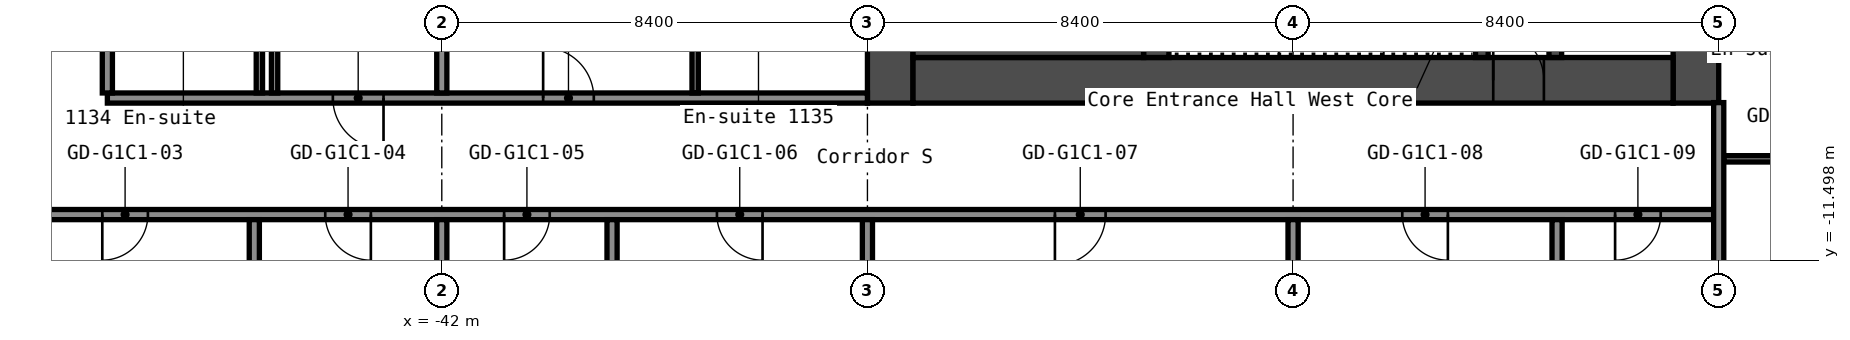
"""IFC4 building model, lengths in metres.
Left out: names, types, materials, properties, quantities, classifications, styles, units other than length and angle.
Written with IfcOpenShell. Run it as: python <this file> out.ifc"""

import sys

from ifc_helpers import new_model, si_unit, direction, frame, frame_2d, origin, place, context, subcontext, project, spatial, rectangle, extrude, element, fill, save


model = new_model("IFC4")
c1 = context("Model", 3, precision=1e-05, world=origin(), true_north=direction((0.0, 1.0)))
c2 = subcontext(c1, "Body", "Model", "MODEL_VIEW")
j1 = project(units=[si_unit("LENGTHUNIT", "METRE"), si_unit("PLANEANGLEUNIT", "RADIAN")], contexts=[c1])
p1 = place(None, origin())
s1 = spatial("IfcSite", under=j1, at=p1, CompositionType="ELEMENT")
p2 = place(p1, origin())
s2 = spatial("IfcBuilding", under=s1, at=p2, CompositionType="ELEMENT")
p3 = place(p2, frame((0.0, 0.0, 42.2)))
s3 = spatial("IfcBuildingStorey", under=s2, at=p3, CompositionType="ELEMENT", Elevation=42.2)
p4 = place(p3, frame((-17.25, -8.4, 0.0), z_axis=(0.0, 0.0, 1.0), x_axis=(0.0, 1.0, 0.0)))
e1 = element("IfcWall", 1, at=p4, inside=s3, PredefinedType="SHEAR", context=c2, shape_type="SweptSolid", body=[
    extrude(rectangle(XDim=16.8, YDim=0.9, at=frame_2d((8.4, 0.0))), origin(), (0.0, 0.0, 1.0), 2.8),
])
p5 = place(p4, frame((12.75, 0.0, 0.0)))
e2 = element("IfcOpeningElement", 2, at=p5, cuts=e1, PredefinedType="OPENING", context=c2, shape_type="SweptSolid", body=[
    extrude(rectangle(XDim=1.2, YDim=2.1, at=frame_2d((0.6, 1.05))), frame((0.0, 0.46, 0.0), z_axis=(0.0, -1.0, 0.0), x_axis=(1.0, 0.0, 0.0)), (0.0, 0.0, 1.0), 0.92),
])
p6 = place(p4, frame((2.85, 0.0, 0.0)))
e3 = element("IfcOpeningElement", 3, at=p6, cuts=e1, PredefinedType="OPENING", context=c2, shape_type="SweptSolid", body=[
    extrude(rectangle(XDim=1.2, YDim=2.1, at=frame_2d((0.6, 1.05))), frame((0.0, 0.46, 0.0), z_axis=(0.0, -1.0, 0.0), x_axis=(1.0, 0.0, 0.0)), (0.0, 0.0, 1.0), 0.92),
])
p7 = place(p3, frame((-33.15, -8.4, 0.0), z_axis=(0.0, 0.0, 1.0), x_axis=(0.0, 1.0, 0.0)))
e4 = element("IfcWall", 4, at=p7, inside=s3, PredefinedType="SHEAR", context=c2, shape_type="SweptSolid", body=[
    extrude(rectangle(XDim=16.8, YDim=0.9, at=frame_2d((8.4, 0.0))), origin(), (0.0, 0.0, 1.0), 2.8),
])
p8 = place(p3, frame((-32.7, -7.95, 0.0), z_axis=(0.0, 0.0, 1.0), x_axis=(1.0, 0.0, 0.0)))
e5 = element("IfcWall", 5, at=p8, inside=s3, PredefinedType="SHEAR", context=c2, shape_type="SweptSolid", body=[
    extrude(rectangle(XDim=15.0, YDim=0.9, at=frame_2d((7.5, 0.0))), origin(), (0.0, 0.0, 1.0), 2.8),
])
p9 = place(p8, frame((11.45, 0.0, 0.0)))
e6 = element("IfcOpeningElement", 6, at=p9, cuts=e5, PredefinedType="OPENING", context=c2, shape_type="SweptSolid", body=[
    extrude(rectangle(XDim=1.0, YDim=2.1, at=frame_2d((0.5, 1.05))), frame((0.0, 0.46, 0.0), z_axis=(0.0, -1.0, 0.0), x_axis=(1.0, 0.0, 0.0)), (0.0, 0.0, 1.0), 0.92),
])
p10 = place(p3, frame((-20.025, -7.5, 0.0), z_axis=(0.0, 0.0, 1.0), x_axis=(0.0, 1.0, 0.0)))
e7 = element("IfcWall", 7, at=p10, inside=s3, PredefinedType="SHEAR", context=c2, shape_type="SweptSolid", body=[
    extrude(rectangle(XDim=6.3, YDim=0.25, at=frame_2d((3.15, 0.0))), origin(), (0.0, 0.0, 1.0), 2.8),
])
p11 = place(p10, frame((2.4, 0.0, 0.0)))
e8 = element("IfcOpeningElement", 8, at=p11, cuts=e7, PredefinedType="OPENING", context=c2, shape_type="SweptSolid", body=[
    extrude(rectangle(XDim=1.0, YDim=2.1, at=frame_2d((0.5, 1.05))), frame((0.0, 0.135, 0.0), z_axis=(0.0, -1.0, 0.0), x_axis=(1.0, 0.0, 0.0)), (0.0, 0.0, 1.0), 0.27),
])
p12 = place(p3, frame((-21.475, -7.5, 0.0), z_axis=(0.0, 0.0, 1.0), x_axis=(0.0, 1.0, 0.0)))
e9 = element("IfcWall", 9, at=p12, inside=s3, PredefinedType="SHEAR", context=c2, shape_type="SweptSolid", body=[
    extrude(rectangle(XDim=3.75, YDim=0.25, at=frame_2d((1.875, 0.0))), origin(), (0.0, 0.0, 1.0), 2.8),
])
p13 = place(p12, frame((1.3, 0.0, 0.0)))
e10 = element("IfcOpeningElement", 10, at=p13, cuts=e9, PredefinedType="OPENING", context=c2, shape_type="SweptSolid", body=[
    extrude(rectangle(XDim=1.2, YDim=2.1, at=frame_2d((0.6, 1.05))), frame((0.0, 0.135, 0.0), z_axis=(0.0, -1.0, 0.0), x_axis=(1.0, 0.0, 0.0)), (0.0, 0.0, 1.0), 0.27),
])
p14 = place(p3, frame((-27.9, -7.5, 0.0), z_axis=(0.0, 0.0, 1.0), x_axis=(0.0, 1.0, 0.0)))
e11 = element("IfcWall", 11, at=p14, inside=s3, PredefinedType="SHEAR", context=c2, shape_type="SweptSolid", body=[
    extrude(rectangle(XDim=3.75, YDim=0.5, at=frame_2d((1.875, 0.0))), origin(), (0.0, 0.0, 1.0), 2.8),
])
p15 = place(p3, frame((-32.7, -6.75, 0.0), z_axis=(0.0, 0.0, 1.0), x_axis=(1.0, 0.0, 0.0)))
e12 = element("IfcWall", 12, at=p15, inside=s3, PredefinedType="SHEAR", context=c2, shape_type="SweptSolid", body=[
    extrude(rectangle(XDim=4.55, YDim=1.5, at=frame_2d((2.275, 0.0))), origin(), (0.0, 0.0, 1.0), 2.8),
])
p16 = place(p3, frame((-51.1, -10.6, 0.0), z_axis=(0.0, 0.0, 1.0), x_axis=(1.0, 0.0, 0.0)))
e13 = element("IfcWall", 13, at=p16, inside=s3, PredefinedType="PARTITIONING", context=c2, shape_type="SweptSolid", body=[
    extrude(rectangle(XDim=34.3, YDim=0.2, at=frame_2d((17.15, 0.0))), origin(), (0.0, 0.0, 1.0), 2.8),
])
p17 = place(p16, frame((2.4, 0.0, 0.0)))
e14 = element("IfcOpeningElement", 14, at=p17, cuts=e13, PredefinedType="OPENING", context=c2, shape_type="SweptSolid", body=[
    extrude(rectangle(XDim=0.9, YDim=2.1, at=frame_2d((0.45, 1.05))), frame((0.0, 0.11, 0.0), z_axis=(0.0, -1.0, 0.0), x_axis=(1.0, 0.0, 0.0)), (0.0, 0.0, 1.0), 0.22),
])
p18 = place(p16, frame((6.8, 0.0, 0.0)))
e15 = element("IfcOpeningElement", 15, at=p18, cuts=e13, PredefinedType="OPENING", context=c2, shape_type="SweptSolid", body=[
    extrude(rectangle(XDim=0.9, YDim=2.1, at=frame_2d((0.45, 1.05))), frame((0.0, 0.11, 0.0), z_axis=(0.0, -1.0, 0.0), x_axis=(1.0, 0.0, 0.0)), (0.0, 0.0, 1.0), 0.22),
])
p19 = place(p16, frame((10.33, 0.0, 0.0)))
e16 = element("IfcOpeningElement", 16, at=p19, cuts=e13, PredefinedType="OPENING", context=c2, shape_type="SweptSolid", body=[
    extrude(rectangle(XDim=0.9, YDim=2.1, at=frame_2d((0.45, 1.05))), frame((0.0, 0.11, 0.0), z_axis=(0.0, -1.0, 0.0), x_axis=(1.0, 0.0, 0.0)), (0.0, 0.0, 1.0), 0.22),
])
p20 = place(p16, frame((14.53, 0.0, 0.0)))
e17 = element("IfcOpeningElement", 17, at=p20, cuts=e13, PredefinedType="OPENING", context=c2, shape_type="SweptSolid", body=[
    extrude(rectangle(XDim=0.9, YDim=2.1, at=frame_2d((0.45, 1.05))), frame((0.0, 0.11, 0.0), z_axis=(0.0, -1.0, 0.0), x_axis=(1.0, 0.0, 0.0)), (0.0, 0.0, 1.0), 0.22),
])
p21 = place(p16, frame((21.2, 0.0, 0.0)))
e18 = element("IfcOpeningElement", 18, at=p21, cuts=e13, PredefinedType="OPENING", context=c2, shape_type="SweptSolid", body=[
    extrude(rectangle(XDim=1.0, YDim=2.1, at=frame_2d((0.5, 1.05))), frame((0.0, 0.11, 0.0), z_axis=(0.0, -1.0, 0.0), x_axis=(1.0, 0.0, 0.0)), (0.0, 0.0, 1.0), 0.22),
])
p22 = place(p16, frame((28.055, 0.0, 0.0)))
e19 = element("IfcOpeningElement", 19, at=p22, cuts=e13, PredefinedType="OPENING", context=c2, shape_type="SweptSolid", body=[
    extrude(rectangle(XDim=0.9, YDim=2.1, at=frame_2d((0.45, 1.05))), frame((0.0, 0.11, 0.0), z_axis=(0.0, -1.0, 0.0), x_axis=(1.0, 0.0, 0.0)), (0.0, 0.0, 1.0), 0.22),
])
p23 = place(p16, frame((32.255, 0.0, 0.0)))
e20 = element("IfcOpeningElement", 20, at=p23, cuts=e13, PredefinedType="OPENING", context=c2, shape_type="SweptSolid", body=[
    extrude(rectangle(XDim=0.9, YDim=2.1, at=frame_2d((0.45, 1.05))), frame((0.0, 0.11, 0.0), z_axis=(0.0, -1.0, 0.0), x_axis=(1.0, 0.0, 0.0)), (0.0, 0.0, 1.0), 0.22),
])
p24 = place(p3, frame((-16.7, -9.5, 0.0), z_axis=(0.0, 0.0, 1.0), x_axis=(1.0, 0.0, 0.0)))
e21 = element("IfcWall", 21, at=p24, inside=s3, PredefinedType="PARTITIONING", context=c2, shape_type="SweptSolid", body=[
    extrude(rectangle(XDim=3.238, YDim=0.125, at=frame_2d((1.619, 0.0))), origin(), (0.0, 0.0, 1.0), 2.8),
])
p25 = place(p24, frame((1.2, 0.0, 0.0)))
e22 = element("IfcOpeningElement", 22, at=p25, cuts=e21, PredefinedType="OPENING", context=c2, shape_type="SweptSolid", body=[
    extrude(rectangle(XDim=0.8, YDim=2.1, at=frame_2d((0.4, 1.05))), frame((0.0, 0.073, 0.0), z_axis=(0.0, -1.0, 0.0), x_axis=(1.0, 0.0, 0.0)), (0.0, 0.0, 1.0), 0.145),
])
p26 = place(p3, frame((-48.6, -8.3, 0.0), z_axis=(0.0, 0.0, 1.0), x_axis=(1.0, 0.0, 0.0)))
e23 = element("IfcWall", 23, at=p26, inside=s3, PredefinedType="PARTITIONING", context=c2, shape_type="SweptSolid", body=[
    extrude(rectangle(XDim=15.0, YDim=0.2, at=frame_2d((7.5, 0.0))), origin(), (0.0, 0.0, 1.0), 2.8),
])
p27 = place(p26, frame((4.45, 0.0, 0.0)))
e24 = element("IfcOpeningElement", 24, at=p27, cuts=e23, PredefinedType="OPENING", context=c2, shape_type="SweptSolid", body=[
    extrude(rectangle(XDim=1.0, YDim=2.1, at=frame_2d((0.5, 1.05))), frame((0.0, 0.11, 0.0), z_axis=(0.0, -1.0, 0.0), x_axis=(1.0, 0.0, 0.0)), (0.0, 0.0, 1.0), 0.22),
])
p28 = place(p26, frame((8.6, 0.0, 0.0)))
e25 = element("IfcOpeningElement", 25, at=p28, cuts=e23, PredefinedType="OPENING", context=c2, shape_type="SweptSolid", body=[
    extrude(rectangle(XDim=1.0, YDim=2.1, at=frame_2d((0.5, 1.05))), frame((0.0, 0.11, 0.0), z_axis=(0.0, -1.0, 0.0), x_axis=(1.0, 0.0, 0.0)), (0.0, 0.0, 1.0), 0.22),
])
p29 = place(p3, frame((-48.6, -8.2, 0.0), z_axis=(0.0, 0.0, 1.0), x_axis=(0.0, 1.0, 0.0)))
e26 = element("IfcWall", 26, at=p29, inside=s3, PredefinedType="PARTITIONING", context=c2, shape_type="SweptSolid", body=[
    extrude(rectangle(XDim=16.4, YDim=0.2, at=frame_2d((8.2, 0.0))), origin(), (0.0, 0.0, 1.0), 2.8),
])
p30 = place(p3, frame((-45.7, -20.3, 0.0), z_axis=(0.0, 0.0, 1.0), x_axis=(0.0, 1.0, 0.0)))
e27 = element("IfcWall", 27, at=p30, inside=s3, PredefinedType="PARTITIONING", context=c2, shape_type="SweptSolid", body=[
    extrude(rectangle(XDim=9.6, YDim=0.2, at=frame_2d((4.8, 0.0))), origin(), (0.0, 0.0, 1.0), 2.8),
])
p31 = place(p3, frame((-45.6, -8.2, 0.0), z_axis=(0.0, 0.0, 1.0), x_axis=(0.0, 1.0, 0.0)))
e28 = element("IfcWall", 28, at=p31, inside=s3, PredefinedType="PARTITIONING", context=c2, shape_type="SweptSolid", body=[
    extrude(rectangle(XDim=3.1, YDim=0.125, at=frame_2d((1.55, 0.0))), origin(), (0.0, 0.0, 1.0), 2.8),
])
p32 = place(p3, frame((-45.3, -8.2, 0.0), z_axis=(0.0, 0.0, 1.0), x_axis=(0.0, 1.0, 0.0)))
e29 = element("IfcWall", 29, at=p32, inside=s3, PredefinedType="PARTITIONING", context=c2, shape_type="SweptSolid", body=[
    extrude(rectangle(XDim=16.4, YDim=0.125, at=frame_2d((8.2, 0.0))), origin(), (0.0, 0.0, 1.0), 2.8),
])
p33 = place(p32, frame((4.05, 0.0, 0.0)))
e30 = element("IfcOpeningElement", 30, at=p33, cuts=e29, PredefinedType="OPENING", context=c2, shape_type="SweptSolid", body=[
    extrude(rectangle(XDim=0.9, YDim=2.1, at=frame_2d((0.45, 1.05))), frame((0.0, 0.073, 0.0), z_axis=(0.0, -1.0, 0.0), x_axis=(1.0, 0.0, 0.0)), (0.0, 0.0, 1.0), 0.145),
])
p34 = place(p32, frame((11.45, 0.0, 0.0)))
e31 = element("IfcOpeningElement", 31, at=p34, cuts=e29, PredefinedType="OPENING", context=c2, shape_type="SweptSolid", body=[
    extrude(rectangle(XDim=0.9, YDim=2.1, at=frame_2d((0.45, 1.05))), frame((0.0, 0.073, 0.0), z_axis=(0.0, -1.0, 0.0), x_axis=(1.0, 0.0, 0.0)), (0.0, 0.0, 1.0), 0.145),
])
p35 = place(p3, frame((-42.0, -20.3, 0.0), z_axis=(0.0, 0.0, 1.0), x_axis=(0.0, 1.0, 0.0)))
e32 = element("IfcWall", 32, at=p35, inside=s3, PredefinedType="PARTITIONING", context=c2, shape_type="SweptSolid", body=[
    extrude(rectangle(XDim=9.6, YDim=0.2, at=frame_2d((4.8, 0.0))), origin(), (0.0, 0.0, 1.0), 2.8),
])
p36 = place(p3, frame((-42.0, -8.2, 0.0), z_axis=(0.0, 0.0, 1.0), x_axis=(0.0, 1.0, 0.0)))
e33 = element("IfcWall", 33, at=p36, inside=s3, PredefinedType="PARTITIONING", context=c2, shape_type="SweptSolid", body=[
    extrude(rectangle(XDim=16.4, YDim=0.2, at=frame_2d((8.2, 0.0))), origin(), (0.0, 0.0, 1.0), 2.8),
])
p37 = place(p3, frame((-38.64, -20.3, 0.0), z_axis=(0.0, 0.0, 1.0), x_axis=(0.0, 1.0, 0.0)))
e34 = element("IfcWall", 34, at=p37, inside=s3, PredefinedType="PARTITIONING", context=c2, shape_type="SweptSolid", body=[
    extrude(rectangle(XDim=9.6, YDim=0.2, at=frame_2d((4.8, 0.0))), origin(), (0.0, 0.0, 1.0), 2.8),
])
p38 = place(p3, frame((-37.0, -8.2, 0.0), z_axis=(0.0, 0.0, 1.0), x_axis=(0.0, 1.0, 0.0)))
e35 = element("IfcWall", 35, at=p38, inside=s3, PredefinedType="PARTITIONING", context=c2, shape_type="SweptSolid", body=[
    extrude(rectangle(XDim=3.3, YDim=0.125, at=frame_2d((1.65, 0.0))), origin(), (0.0, 0.0, 1.0), 2.8),
])
for number, where, z_axis, x_axis in (
    (36, (-33.6, -20.3, 0.0), (0.0, 0.0, 1.0), (0.0, 1.0, 0.0)),
    (37, (-25.2, -20.3, 0.0), (0.0, 0.0, 1.0), (0.0, 1.0, 0.0)),
    (38, (-19.99, -20.3, 0.0), (0.0, 0.0, 1.0), (0.0, 1.0, 0.0)),
):
    element("IfcWall", number, at=place(p3, frame(where, z_axis=z_axis, x_axis=x_axis)), inside=s3, PredefinedType="PARTITIONING", context=c2, shape_type="SweptSolid", body=[
        extrude(rectangle(XDim=9.6, YDim=0.2, at=frame_2d((4.8, 0.0))), origin(), (0.0, 0.0, 1.0), 2.8),
    ])
p39 = place(p3, frame((-16.8, -20.3, 0.0), z_axis=(0.0, 0.0, 1.0), x_axis=(0.0, 1.0, 0.0)))
e39 = element("IfcWall", 39, at=p39, inside=s3, PredefinedType="PARTITIONING", context=c2, shape_type="SweptSolid", body=[
    extrude(rectangle(XDim=11.91, YDim=0.2, at=frame_2d((5.955, 0.0))), origin(), (0.0, 0.0, 1.0), 2.8),
])
p40 = place(p9, origin())
e40 = element("IfcDoor", 40, at=p40, inside=s3, OperationType="SINGLE_SWING_RIGHT", PredefinedType="DOOR", context=c2, shape_type="SweptSolid", body=[
    extrude(rectangle(XDim=1.0, YDim=2.1, at=frame_2d((0.5, 1.05))), frame((0.0, 0.025, 0.0), z_axis=(0.0, -1.0, 0.0), x_axis=(1.0, 0.0, 0.0)), (0.0, 0.0, 1.0), 0.05),
])
fill(e6, e40)
p41 = place(p17, origin())
e41 = element("IfcDoor", 41, at=p41, inside=s3, OperationType="SINGLE_SWING_LEFT", PredefinedType="DOOR", context=c2, shape_type="SweptSolid", body=[
    extrude(rectangle(XDim=0.9, YDim=2.1, at=frame_2d((0.45, 1.05))), frame((0.0, 0.025, 0.0), z_axis=(0.0, -1.0, 0.0), x_axis=(1.0, 0.0, 0.0)), (0.0, 0.0, 1.0), 0.05),
])
fill(e14, e41)
p42 = place(p18, origin())
e42 = element("IfcDoor", 42, at=p42, inside=s3, OperationType="SINGLE_SWING_RIGHT", PredefinedType="DOOR", context=c2, shape_type="SweptSolid", body=[
    extrude(rectangle(XDim=0.9, YDim=2.1, at=frame_2d((0.45, 1.05))), frame((0.0, 0.025, 0.0), z_axis=(0.0, -1.0, 0.0), x_axis=(1.0, 0.0, 0.0)), (0.0, 0.0, 1.0), 0.05),
])
fill(e15, e42)
p43 = place(p19, origin())
e43 = element("IfcDoor", 43, at=p43, inside=s3, OperationType="SINGLE_SWING_LEFT", PredefinedType="DOOR", context=c2, shape_type="SweptSolid", body=[
    extrude(rectangle(XDim=0.9, YDim=2.1, at=frame_2d((0.45, 1.05))), frame((0.0, 0.025, 0.0), z_axis=(0.0, -1.0, 0.0), x_axis=(1.0, 0.0, 0.0)), (0.0, 0.0, 1.0), 0.05),
])
fill(e16, e43)
p44 = place(p20, origin())
e44 = element("IfcDoor", 44, at=p44, inside=s3, OperationType="SINGLE_SWING_RIGHT", PredefinedType="DOOR", context=c2, shape_type="SweptSolid", body=[
    extrude(rectangle(XDim=0.9, YDim=2.1, at=frame_2d((0.45, 1.05))), frame((0.0, 0.025, 0.0), z_axis=(0.0, -1.0, 0.0), x_axis=(1.0, 0.0, 0.0)), (0.0, 0.0, 1.0), 0.05),
])
fill(e17, e44)
p45 = place(p21, origin())
e45 = element("IfcDoor", 45, at=p45, inside=s3, OperationType="SINGLE_SWING_LEFT", PredefinedType="DOOR", context=c2, shape_type="SweptSolid", body=[
    extrude(rectangle(XDim=1.0, YDim=2.1, at=frame_2d((0.5, 1.05))), frame((0.0, 0.025, 0.0), z_axis=(0.0, -1.0, 0.0), x_axis=(1.0, 0.0, 0.0)), (0.0, 0.0, 1.0), 0.05),
])
fill(e18, e45)
p46 = place(p22, origin())
e46 = element("IfcDoor", 46, at=p46, inside=s3, OperationType="SINGLE_SWING_RIGHT", PredefinedType="DOOR", context=c2, shape_type="SweptSolid", body=[
    extrude(rectangle(XDim=0.9, YDim=2.1, at=frame_2d((0.45, 1.05))), frame((0.0, 0.025, 0.0), z_axis=(0.0, -1.0, 0.0), x_axis=(1.0, 0.0, 0.0)), (0.0, 0.0, 1.0), 0.05),
])
fill(e19, e46)
p47 = place(p23, origin())
e47 = element("IfcDoor", 47, at=p47, inside=s3, OperationType="SINGLE_SWING_LEFT", PredefinedType="DOOR", context=c2, shape_type="SweptSolid", body=[
    extrude(rectangle(XDim=0.9, YDim=2.1, at=frame_2d((0.45, 1.05))), frame((0.0, 0.025, 0.0), z_axis=(0.0, -1.0, 0.0), x_axis=(1.0, 0.0, 0.0)), (0.0, 0.0, 1.0), 0.05),
])
fill(e20, e47)
p48 = place(p27, origin())
e48 = element("IfcDoor", 48, at=p48, inside=s3, OperationType="SINGLE_SWING_RIGHT", PredefinedType="DOOR", context=c2, shape_type="SweptSolid", body=[
    extrude(rectangle(XDim=1.0, YDim=2.1, at=frame_2d((0.5, 1.05))), frame((0.0, 0.025, 0.0), z_axis=(0.0, -1.0, 0.0), x_axis=(1.0, 0.0, 0.0)), (0.0, 0.0, 1.0), 0.05),
])
fill(e24, e48)
p49 = place(p28, origin())
e49 = element("IfcDoor", 49, at=p49, inside=s3, OperationType="SINGLE_SWING_RIGHT", PredefinedType="DOOR", context=c2, shape_type="SweptSolid", body=[
    extrude(rectangle(XDim=1.0, YDim=2.1, at=frame_2d((0.5, 1.05))), frame((0.0, 0.025, 0.0), z_axis=(0.0, -1.0, 0.0), x_axis=(1.0, 0.0, 0.0)), (0.0, 0.0, 1.0), 0.05),
])
fill(e25, e49)
save(model, sys.argv[1])
